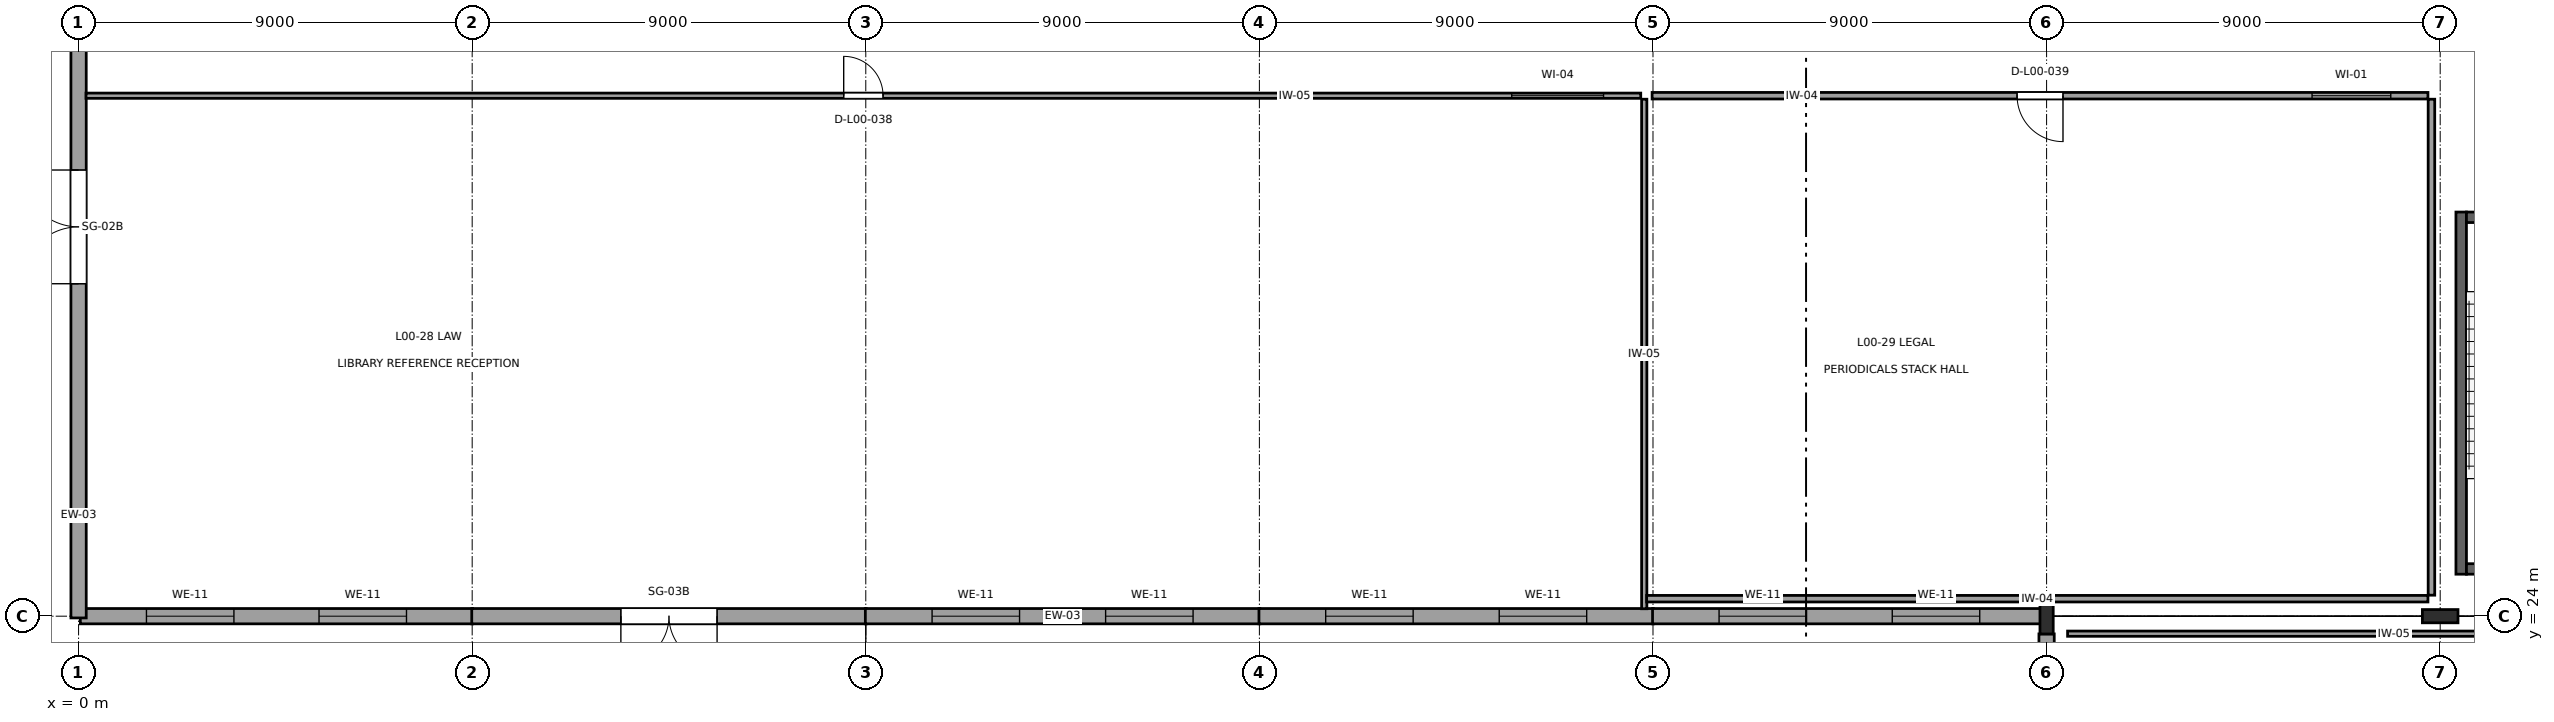
"""IFC4 building model, lengths in metres.
Left out: names, types, materials, properties, quantities, classifications, styles, units other than length and angle.
Written with IfcOpenShell. Run it as: python <this file> out.ifc"""

import sys

from ifc_helpers import new_model, si_unit, direction, frame, frame_2d, origin, origin_2d, place, context, subcontext, project, spatial, rectangle, i_section, extrude, element, fill, save


model = new_model("IFC4")
c1 = context("Model", 3, precision=1e-05, world=origin(), true_north=direction((0.0, 1.0)))
c2 = subcontext(c1, "Body", "Model", "MODEL_VIEW")
j1 = project(units=[si_unit("LENGTHUNIT", "METRE"), si_unit("PLANEANGLEUNIT", "RADIAN")], contexts=[c1])
p1 = place(None, origin())
s1 = spatial("IfcSite", under=j1, at=p1, CompositionType="ELEMENT")
p2 = place(p1, origin())
s2 = spatial("IfcBuilding", under=s1, at=p2, CompositionType="ELEMENT")
p3 = place(p2, origin())
s3 = spatial("IfcBuildingStorey", under=s2, at=p3, CompositionType="ELEMENT", Elevation=0.0)
for number, where, z_axis, x_axis in (
    (1, (45.0, 24.0, 0.0), (0.0, 0.0, 1.0), (1.0, 0.0, 0.0)),
    (2, (54.0, 24.0, 0.0), (0.0, 0.0, 1.0), (0.0, 1.0, 0.0)),
):
    element("IfcColumn", number, at=place(p3, frame(where, z_axis=z_axis, x_axis=x_axis)), inside=s3, PredefinedType="COLUMN", context=c2, shape_type="SweptSolid", body=[
        extrude(i_section(OverallWidth=0.303, OverallDepth=0.814, WebThickness=0.021, FlangeThickness=0.04, at=origin_2d()), origin(), (0.0, 0.0, 1.0), 5.4),
    ])
p4 = place(p3, frame((0.04, 24.0, 0.0), z_axis=(0.0, 0.0, 1.0), x_axis=(1.0, 0.0, 0.0)))
e3 = element("IfcWall", 3, at=p4, inside=s3, PredefinedType="SOLIDWALL", context=c2, shape_type="SweptSolid", body=[
    extrude(rectangle(XDim=8.97, YDim=0.35, at=frame_2d((4.485, 0.0))), origin(), (0.0, 0.0, 1.0), 5.08),
])
p5 = place(p4, frame((1.512, 0.0, 0.85)))
e4 = element("IfcOpeningElement", 4, at=p5, cuts=e3, PredefinedType="OPENING", context=c2, shape_type="SweptSolid", body=[
    extrude(rectangle(XDim=2.0, YDim=2.0, at=frame_2d((1.0, 1.0))), frame((0.0, 0.19, 0.0), z_axis=(0.0, -1.0, 0.0), x_axis=(1.0, 0.0, 0.0)), (0.0, 0.0, 1.0), 0.38),
])
p6 = place(p4, frame((5.458, 0.0, 0.85)))
e5 = element("IfcOpeningElement", 5, at=p6, cuts=e3, PredefinedType="OPENING", context=c2, shape_type="SweptSolid", body=[
    extrude(rectangle(XDim=2.0, YDim=2.0, at=frame_2d((1.0, 1.0))), frame((0.0, 0.19, 0.0), z_axis=(0.0, -1.0, 0.0), x_axis=(1.0, 0.0, 0.0)), (0.0, 0.0, 1.0), 0.38),
])
p7 = place(p3, frame((8.99, 24.0, 0.0), z_axis=(0.0, 0.0, 1.0), x_axis=(1.0, 0.0, 0.0)))
e6 = element("IfcWall", 6, at=p7, inside=s3, PredefinedType="SOLIDWALL", context=c2, shape_type="SweptSolid", body=[
    extrude(rectangle(XDim=9.02, YDim=0.35, at=frame_2d((4.51, 0.0))), origin(), (0.0, 0.0, 1.0), 5.08),
])
p8 = place(p7, frame((3.41, 0.0, 0.0)))
e7 = element("IfcOpeningElement", 7, at=p8, cuts=e6, PredefinedType="OPENING", context=c2, shape_type="SweptSolid", body=[
    extrude(rectangle(XDim=2.2, YDim=2.5, at=frame_2d((1.1, 1.25))), frame((0.0, 0.19, 0.0), z_axis=(0.0, -1.0, 0.0), x_axis=(1.0, 0.0, 0.0)), (0.0, 0.0, 1.0), 0.38),
])
p9 = place(p3, frame((17.99, 24.0, 0.0), z_axis=(0.0, 0.0, 1.0), x_axis=(1.0, 0.0, 0.0)))
e8 = element("IfcWall", 8, at=p9, inside=s3, PredefinedType="SOLIDWALL", context=c2, shape_type="SweptSolid", body=[
    extrude(rectangle(XDim=9.02, YDim=0.35, at=frame_2d((4.51, 0.0))), origin(), (0.0, 0.0, 1.0), 5.08),
])
p10 = place(p9, frame((1.526, 0.0, 0.85)))
e9 = element("IfcOpeningElement", 9, at=p10, cuts=e8, PredefinedType="OPENING", context=c2, shape_type="SweptSolid", body=[
    extrude(rectangle(XDim=2.0, YDim=2.0, at=frame_2d((1.0, 1.0))), frame((0.0, 0.19, 0.0), z_axis=(0.0, -1.0, 0.0), x_axis=(1.0, 0.0, 0.0)), (0.0, 0.0, 1.0), 0.38),
])
p11 = place(p9, frame((5.494, 0.0, 0.85)))
e10 = element("IfcOpeningElement", 10, at=p11, cuts=e8, PredefinedType="OPENING", context=c2, shape_type="SweptSolid", body=[
    extrude(rectangle(XDim=2.0, YDim=2.0, at=frame_2d((1.0, 1.0))), frame((0.0, 0.19, 0.0), z_axis=(0.0, -1.0, 0.0), x_axis=(1.0, 0.0, 0.0)), (0.0, 0.0, 1.0), 0.38),
])
p12 = place(p3, frame((26.99, 24.0, 0.0), z_axis=(0.0, 0.0, 1.0), x_axis=(1.0, 0.0, 0.0)))
e11 = element("IfcWall", 11, at=p12, inside=s3, PredefinedType="SOLIDWALL", context=c2, shape_type="SweptSolid", body=[
    extrude(rectangle(XDim=9.02, YDim=0.35, at=frame_2d((4.51, 0.0))), origin(), (0.0, 0.0, 1.0), 4.047),
])
p13 = place(p12, frame((1.526, 0.0, 0.85)))
e12 = element("IfcOpeningElement", 12, at=p13, cuts=e11, PredefinedType="OPENING", context=c2, shape_type="SweptSolid", body=[
    extrude(rectangle(XDim=2.0, YDim=2.0, at=frame_2d((1.0, 1.0))), frame((0.0, 0.19, 0.0), z_axis=(0.0, -1.0, 0.0), x_axis=(1.0, 0.0, 0.0)), (0.0, 0.0, 1.0), 0.38),
])
p14 = place(p12, frame((5.494, 0.0, 0.85)))
e13 = element("IfcOpeningElement", 13, at=p14, cuts=e11, PredefinedType="OPENING", context=c2, shape_type="SweptSolid", body=[
    extrude(rectangle(XDim=2.0, YDim=2.0, at=frame_2d((1.0, 1.0))), frame((0.0, 0.19, 0.0), z_axis=(0.0, -1.0, 0.0), x_axis=(1.0, 0.0, 0.0)), (0.0, 0.0, 1.0), 0.38),
])
p15 = place(p3, frame((35.99, 24.0, 0.0), z_axis=(0.0, 0.0, 1.0), x_axis=(1.0, 0.0, 0.0)))
e14 = element("IfcWall", 14, at=p15, inside=s3, PredefinedType="SOLIDWALL", context=c2, shape_type="SweptSolid", body=[
    extrude(rectangle(XDim=9.002, YDim=0.35, at=frame_2d((4.501, 0.0))), origin(), (0.0, 0.0, 1.0), 4.047),
])
p16 = place(p15, frame((1.521, 0.0, 0.85)))
e15 = element("IfcOpeningElement", 15, at=p16, cuts=e14, PredefinedType="OPENING", context=c2, shape_type="SweptSolid", body=[
    extrude(rectangle(XDim=2.0, YDim=2.0, at=frame_2d((1.0, 1.0))), frame((0.0, 0.19, 0.0), z_axis=(0.0, -1.0, 0.0), x_axis=(1.0, 0.0, 0.0)), (0.0, 0.0, 1.0), 0.38),
])
p17 = place(p15, frame((5.481, 0.0, 0.85)))
e16 = element("IfcOpeningElement", 16, at=p17, cuts=e14, PredefinedType="OPENING", context=c2, shape_type="SweptSolid", body=[
    extrude(rectangle(XDim=2.0, YDim=2.0, at=frame_2d((1.0, 1.0))), frame((0.0, 0.19, 0.0), z_axis=(0.0, -1.0, 0.0), x_axis=(1.0, 0.0, 0.0)), (0.0, 0.0, 1.0), 0.38),
])
p18 = place(p3, frame((0.0, 41.842, 0.0), z_axis=(0.0, 0.0, 1.0), x_axis=(0.0, -1.0, 0.0)))
e17 = element("IfcWall", 17, at=p18, inside=s3, PredefinedType="SOLIDWALL", context=c2, shape_type="SweptSolid", body=[
    extrude(rectangle(XDim=17.882, YDim=0.35, at=frame_2d((8.941, 0.0))), origin(), (0.0, 0.0, 1.0), 5.08),
])
p19 = place(p18, frame((7.641, 0.0, 0.0)))
e18 = element("IfcOpeningElement", 18, at=p19, cuts=e17, PredefinedType="OPENING", context=c2, shape_type="SweptSolid", body=[
    extrude(rectangle(XDim=2.6, YDim=2.6, at=frame_2d((1.3, 1.3))), frame((0.0, 0.19, 0.0), z_axis=(0.0, -1.0, 0.0), x_axis=(1.0, 0.0, 0.0)), (0.0, 0.0, 1.0), 0.38),
])
p20 = place(p3, frame((45.0, 23.595, 0.0), z_axis=(0.0, 0.0, 1.0), x_axis=(0.0, -1.0, 0.0)))
e19 = element("IfcWall", 19, at=p20, inside=s3, PredefinedType="SOLIDWALL", context=c2, shape_type="SweptSolid", body=[
    extrude(rectangle(XDim=11.19, YDim=0.35, at=frame_2d((5.595, 0.0))), origin(), (0.0, 0.0, 1.0), 4.725),
])
p21 = place(p20, frame((4.595, 0.0, 0.0)))
e20 = element("IfcOpeningElement", 20, at=p21, cuts=e19, PredefinedType="OPENING", context=c2, shape_type="SweptSolid", body=[
    extrude(rectangle(XDim=2.4, YDim=2.8, at=frame_2d((1.2, 1.4))), frame((0.0, 0.19, 0.0), z_axis=(0.0, -1.0, 0.0), x_axis=(1.0, 0.0, 0.0)), (0.0, 0.0, 1.0), 0.38),
])
p22 = place(p20, frame((8.09, 0.0, 0.0)))
e21 = element("IfcOpeningElement", 21, at=p22, cuts=e19, PredefinedType="OPENING", context=c2, shape_type="SweptSolid", body=[
    extrude(rectangle(XDim=1.8, YDim=2.4, at=frame_2d((0.9, 1.2))), frame((0.0, 0.19, 0.0), z_axis=(0.0, -1.0, 0.0), x_axis=(1.0, 0.0, 0.0)), (0.0, 0.0, 1.0), 0.38),
])
p23 = place(p3, frame((54.48, 24.96, 0.0), z_axis=(0.0, 0.0, 1.0), x_axis=(0.0, 1.0, 0.0)))
e22 = element("IfcWall", 22, at=p23, inside=s3, PredefinedType="SHEAR", context=c2, shape_type="SweptSolid", body=[
    extrude(rectangle(XDim=8.28, YDim=0.24, at=frame_2d((4.14, 0.0))), origin(), (0.0, 0.0, 1.0), 5.21),
])
for number, where, z_axis, x_axis in (
    (23, (54.6, 25.08, 0.0), (0.0, 0.0, 1.0), (1.0, 0.0, 0.0)),
    (24, (54.6, 33.12, 0.0), (0.0, 0.0, 1.0), (1.0, 0.0, 0.0)),
):
    element("IfcWall", number, at=place(p3, frame(where, z_axis=z_axis, x_axis=x_axis)), inside=s3, PredefinedType="SHEAR", context=c2, shape_type="SweptSolid", body=[
        extrude(rectangle(XDim=3.7, YDim=0.24, at=frame_2d((1.85, 0.0))), origin(), (0.0, 0.0, 1.0), 5.21),
    ])
p24 = place(p3, frame((0.17, 35.9, 0.0), z_axis=(0.0, 0.0, 1.0), x_axis=(1.0, 0.0, 0.0)))
e25 = element("IfcWall", 25, at=p24, inside=s3, PredefinedType="PARTITIONING", context=c2, shape_type="SweptSolid", body=[
    extrude(rectangle(XDim=35.55, YDim=0.12, at=frame_2d((17.775, 0.0))), origin(), (0.0, 0.0, 1.0), 5.04),
])
p25 = place(p24, frame((17.325, 0.0, 0.0)))
e26 = element("IfcOpeningElement", 26, at=p25, cuts=e25, PredefinedType="OPENING", context=c2, shape_type="SweptSolid", body=[
    extrude(rectangle(XDim=0.9, YDim=2.1, at=frame_2d((0.45, 1.05))), frame((0.0, 0.075, 0.0), z_axis=(0.0, -1.0, 0.0), x_axis=(1.0, 0.0, 0.0)), (0.0, 0.0, 1.0), 0.15),
])
p26 = place(p24, frame((32.6, 0.0, 1.05)))
e27 = element("IfcOpeningElement", 27, at=p26, cuts=e25, PredefinedType="OPENING", context=c2, shape_type="SweptSolid", body=[
    extrude(rectangle(XDim=2.1, YDim=1.2, at=frame_2d((1.05, 0.6))), frame((0.0, 0.075, 0.0), z_axis=(0.0, -1.0, 0.0), x_axis=(1.0, 0.0, 0.0)), (0.0, 0.0, 1.0), 0.15),
])
p27 = place(p3, frame((35.8, 35.82, 0.0), z_axis=(0.0, 0.0, 1.0), x_axis=(0.0, -1.0, 0.0)))
e28 = element("IfcWall", 28, at=p27, inside=s3, PredefinedType="PARTITIONING", context=c2, shape_type="SweptSolid", body=[
    extrude(rectangle(XDim=11.65, YDim=0.12, at=frame_2d((5.825, 0.0))), origin(), (0.0, 0.0, 1.0), 5.04),
])
p28 = place(p3, frame((53.8, 35.82, 0.0), z_axis=(0.0, 0.0, 1.0), x_axis=(0.0, -1.0, 0.0)))
e29 = element("IfcWall", 29, at=p28, inside=s3, PredefinedType="PARTITIONING", context=c2, shape_type="SweptSolid", body=[
    extrude(rectangle(XDim=11.34, YDim=0.15, at=frame_2d((5.67, 0.0))), origin(), (0.0, 0.0, 1.0), 4.365),
])
p29 = place(p3, frame((53.72, 24.4, 0.0), z_axis=(0.0, 0.0, 1.0), x_axis=(-1.0, 0.0, 0.0)))
e30 = element("IfcWall", 30, at=p29, inside=s3, PredefinedType="PARTITIONING", context=c2, shape_type="SweptSolid", body=[
    extrude(rectangle(XDim=17.865, YDim=0.15, at=frame_2d((8.933, 0.0))), origin(), (0.0, 0.0, 1.0), 5.04),
])
p30 = place(p3, frame((35.98, 35.9, 0.0), z_axis=(0.0, 0.0, 1.0), x_axis=(1.0, 0.0, 0.0)))
e31 = element("IfcWall", 31, at=p30, inside=s3, PredefinedType="PARTITIONING", context=c2, shape_type="SweptSolid", body=[
    extrude(rectangle(XDim=17.74, YDim=0.15, at=frame_2d((8.87, 0.0))), origin(), (0.0, 0.0, 1.0), 5.04),
])
p31 = place(p30, frame((8.345, 0.0, 0.0)))
e32 = element("IfcOpeningElement", 32, at=p31, cuts=e31, PredefinedType="OPENING", context=c2, shape_type="SweptSolid", body=[
    extrude(rectangle(XDim=1.05, YDim=2.25, at=frame_2d((0.525, 1.125))), frame((0.0, 0.09, 0.0), z_axis=(0.0, -1.0, 0.0), x_axis=(1.0, 0.0, 0.0)), (0.0, 0.0, 1.0), 0.18),
])
p32 = place(p30, frame((15.09, 0.0, 1.05)))
e33 = element("IfcOpeningElement", 33, at=p32, cuts=e31, PredefinedType="OPENING", context=c2, shape_type="SweptSolid", body=[
    extrude(rectangle(XDim=1.8, YDim=1.1, at=frame_2d((0.9, 0.55))), frame((0.0, 0.09, 0.0), z_axis=(0.0, -1.0, 0.0), x_axis=(1.0, 0.0, 0.0)), (0.0, 0.0, 1.0), 0.18),
])
p33 = place(p3, frame((45.48, 23.6, 0.0), z_axis=(0.0, 0.0, 1.0), x_axis=(1.0, 0.0, 0.0)))
e34 = element("IfcWall", 34, at=p33, inside=s3, PredefinedType="PARTITIONING", context=c2, shape_type="SweptSolid", body=[
    extrude(rectangle(XDim=26.44, YDim=0.12, at=frame_2d((13.22, 0.0))), origin(), (0.0, 0.0, 1.0), 5.04),
])
p34 = place(p19, frame((2.6, 0.0, 0.0), z_axis=(0.0, 0.0, 1.0), x_axis=(-1.0, 0.0, 0.0)))
e35 = element("IfcDoor", 35, at=p34, inside=s3, OperationType="DOUBLE_DOOR_SINGLE_SWING", PredefinedType="GATE", context=c2, shape_type="SweptSolid", body=[
    extrude(rectangle(XDim=2.6, YDim=2.6, at=frame_2d((1.3, 1.3))), frame((0.0, 0.025, 0.0), z_axis=(0.0, -1.0, 0.0), x_axis=(1.0, 0.0, 0.0)), (0.0, 0.0, 1.0), 0.05),
])
fill(e18, e35)
p35 = place(p8, frame((2.2, 0.0, 0.0), z_axis=(0.0, 0.0, 1.0), x_axis=(-1.0, 0.0, 0.0)))
e36 = element("IfcDoor", 36, at=p35, inside=s3, OperationType="DOUBLE_DOOR_SINGLE_SWING", PredefinedType="GATE", context=c2, shape_type="SweptSolid", body=[
    extrude(rectangle(XDim=2.2, YDim=2.5, at=frame_2d((1.1, 1.25))), frame((0.0, 0.025, 0.0), z_axis=(0.0, -1.0, 0.0), x_axis=(1.0, 0.0, 0.0)), (0.0, 0.0, 1.0), 0.05),
])
fill(e7, e36)
p36 = place(p5, origin())
e37 = element("IfcWindow", 37, at=p36, inside=s3, PartitioningType="SINGLE_PANEL", PredefinedType="WINDOW", context=c2, shape_type="SweptSolid", body=[
    extrude(rectangle(XDim=2.0, YDim=2.0, at=frame_2d((1.0, 1.0))), frame((0.0, 0.03, 0.0), z_axis=(0.0, -1.0, 0.0), x_axis=(1.0, 0.0, 0.0)), (0.0, 0.0, 1.0), 0.06),
])
fill(e4, e37)
p37 = place(p6, origin())
e38 = element("IfcWindow", 38, at=p37, inside=s3, PartitioningType="SINGLE_PANEL", PredefinedType="WINDOW", context=c2, shape_type="SweptSolid", body=[
    extrude(rectangle(XDim=2.0, YDim=2.0, at=frame_2d((1.0, 1.0))), frame((0.0, 0.03, 0.0), z_axis=(0.0, -1.0, 0.0), x_axis=(1.0, 0.0, 0.0)), (0.0, 0.0, 1.0), 0.06),
])
fill(e5, e38)
p38 = place(p10, origin())
e39 = element("IfcWindow", 39, at=p38, inside=s3, PartitioningType="SINGLE_PANEL", PredefinedType="WINDOW", context=c2, shape_type="SweptSolid", body=[
    extrude(rectangle(XDim=2.0, YDim=2.0, at=frame_2d((1.0, 1.0))), frame((0.0, 0.03, 0.0), z_axis=(0.0, -1.0, 0.0), x_axis=(1.0, 0.0, 0.0)), (0.0, 0.0, 1.0), 0.06),
])
fill(e9, e39)
p39 = place(p11, origin())
e40 = element("IfcWindow", 40, at=p39, inside=s3, PartitioningType="SINGLE_PANEL", PredefinedType="WINDOW", context=c2, shape_type="SweptSolid", body=[
    extrude(rectangle(XDim=2.0, YDim=2.0, at=frame_2d((1.0, 1.0))), frame((0.0, 0.03, 0.0), z_axis=(0.0, -1.0, 0.0), x_axis=(1.0, 0.0, 0.0)), (0.0, 0.0, 1.0), 0.06),
])
fill(e10, e40)
p40 = place(p13, origin())
e41 = element("IfcWindow", 41, at=p40, inside=s3, PartitioningType="SINGLE_PANEL", PredefinedType="WINDOW", context=c2, shape_type="SweptSolid", body=[
    extrude(rectangle(XDim=2.0, YDim=2.0, at=frame_2d((1.0, 1.0))), frame((0.0, 0.03, 0.0), z_axis=(0.0, -1.0, 0.0), x_axis=(1.0, 0.0, 0.0)), (0.0, 0.0, 1.0), 0.06),
])
fill(e12, e41)
p41 = place(p14, origin())
e42 = element("IfcWindow", 42, at=p41, inside=s3, PartitioningType="SINGLE_PANEL", PredefinedType="WINDOW", context=c2, shape_type="SweptSolid", body=[
    extrude(rectangle(XDim=2.0, YDim=2.0, at=frame_2d((1.0, 1.0))), frame((0.0, 0.03, 0.0), z_axis=(0.0, -1.0, 0.0), x_axis=(1.0, 0.0, 0.0)), (0.0, 0.0, 1.0), 0.06),
])
fill(e13, e42)
p42 = place(p16, origin())
e43 = element("IfcWindow", 43, at=p42, inside=s3, PartitioningType="SINGLE_PANEL", PredefinedType="WINDOW", context=c2, shape_type="SweptSolid", body=[
    extrude(rectangle(XDim=2.0, YDim=2.0, at=frame_2d((1.0, 1.0))), frame((0.0, 0.03, 0.0), z_axis=(0.0, -1.0, 0.0), x_axis=(1.0, 0.0, 0.0)), (0.0, 0.0, 1.0), 0.06),
])
fill(e15, e43)
p43 = place(p17, origin())
e44 = element("IfcWindow", 44, at=p43, inside=s3, PartitioningType="SINGLE_PANEL", PredefinedType="WINDOW", context=c2, shape_type="SweptSolid", body=[
    extrude(rectangle(XDim=2.0, YDim=2.0, at=frame_2d((1.0, 1.0))), frame((0.0, 0.03, 0.0), z_axis=(0.0, -1.0, 0.0), x_axis=(1.0, 0.0, 0.0)), (0.0, 0.0, 1.0), 0.06),
])
fill(e16, e44)
p44 = place(p25, origin())
e45 = element("IfcDoor", 45, at=p44, inside=s3, OperationType="SINGLE_SWING_LEFT", PredefinedType="DOOR", context=c2, shape_type="SweptSolid", body=[
    extrude(rectangle(XDim=0.9, YDim=2.1, at=frame_2d((0.45, 1.05))), frame((0.0, 0.025, 0.0), z_axis=(0.0, -1.0, 0.0), x_axis=(1.0, 0.0, 0.0)), (0.0, 0.0, 1.0), 0.05),
])
fill(e26, e45)
p45 = place(p26, origin())
e46 = element("IfcWindow", 46, at=p45, inside=s3, PartitioningType="SINGLE_PANEL", PredefinedType="WINDOW", context=c2, shape_type="SweptSolid", body=[
    extrude(rectangle(XDim=2.1, YDim=1.2, at=frame_2d((1.05, 0.6))), frame((0.0, 0.03, 0.0), z_axis=(0.0, -1.0, 0.0), x_axis=(1.0, 0.0, 0.0)), (0.0, 0.0, 1.0), 0.06),
])
fill(e27, e46)
p46 = place(p31, frame((1.05, 0.0, 0.0), z_axis=(0.0, 0.0, 1.0), x_axis=(-1.0, 0.0, 0.0)))
e47 = element("IfcDoor", 47, at=p46, inside=s3, OperationType="SINGLE_SWING_RIGHT", PredefinedType="DOOR", context=c2, shape_type="SweptSolid", body=[
    extrude(rectangle(XDim=1.05, YDim=2.25, at=frame_2d((0.525, 1.125))), frame((0.0, 0.025, 0.0), z_axis=(0.0, -1.0, 0.0), x_axis=(1.0, 0.0, 0.0)), (0.0, 0.0, 1.0), 0.05),
])
fill(e32, e47)
p47 = place(p32, origin())
e48 = element("IfcWindow", 48, at=p47, inside=s3, PartitioningType="SINGLE_PANEL", PredefinedType="WINDOW", context=c2, shape_type="SweptSolid", body=[
    extrude(rectangle(XDim=1.8, YDim=1.1, at=frame_2d((0.9, 0.55))), frame((0.0, 0.03, 0.0), z_axis=(0.0, -1.0, 0.0), x_axis=(1.0, 0.0, 0.0)), (0.0, 0.0, 1.0), 0.06),
])
fill(e33, e48)
save(model, sys.argv[1])
